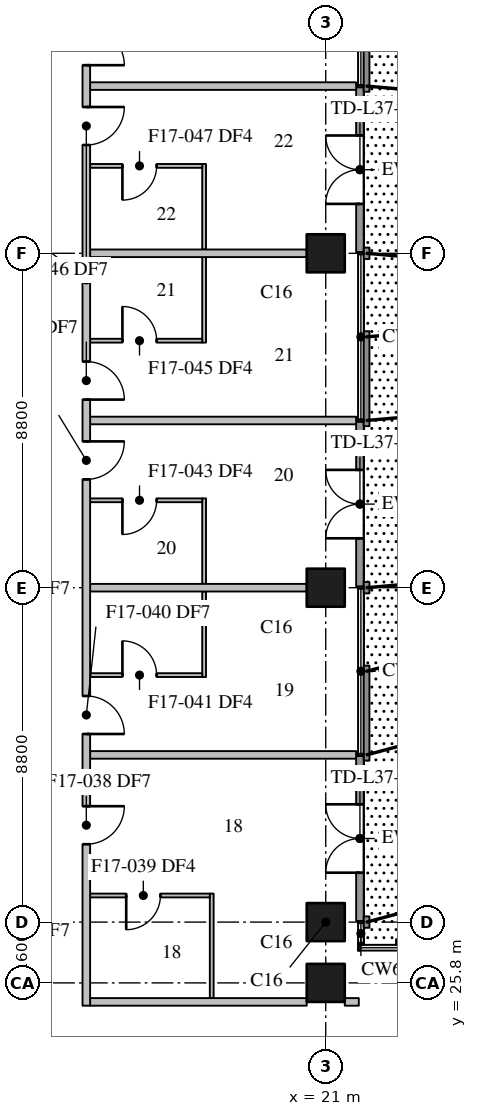
"""IFC4 building model, lengths in metres.
Left out: names, types, materials, properties, quantities, classifications, styles, units other than length and angle.
Written with IfcOpenShell. Run it as: python <this file> out.ifc"""

import sys

from ifc_helpers import new_model, si_unit, direction, frame, frame_2d, origin, origin_2d, place, context, subcontext, project, spatial, rectangle, extrude, element, fill, save


model = new_model("IFC4")
c1 = context("Model", 3, precision=1e-05, world=origin(), true_north=direction((0.0, 1.0)))
c2 = subcontext(c1, "Body", "Model", "MODEL_VIEW")
j1 = project(units=[si_unit("LENGTHUNIT", "METRE"), si_unit("PLANEANGLEUNIT", "RADIAN")], contexts=[c1])
p1 = place(None, origin())
s1 = spatial("IfcSite", under=j1, at=p1, CompositionType="ELEMENT")
p2 = place(p1, origin())
s2 = spatial("IfcBuilding", under=s1, at=p2, CompositionType="ELEMENT")
p3 = place(p2, frame((0.0, 0.0, 153.1)))
s3 = spatial("IfcBuildingStorey", under=s2, at=p3, CompositionType="ELEMENT", Elevation=153.1)
for number, where, z_axis, x_axis in (
    (1, (21.0, 25.8, 0.0), (0.0, 0.0, 1.0), (1.0, 0.0, 0.0)),
    (2, (21.0, 27.4, 0.0), (0.0, 0.0, 1.0), (1.0, 0.0, 0.0)),
    (3, (21.0, 36.2, 0.0), (0.0, 0.0, 1.0), (1.0, 0.0, 0.0)),
    (4, (21.0, 45.0, 0.0), (0.0, 0.0, 1.0), (1.0, 0.0, 0.0)),
):
    element("IfcColumn", number, at=place(p3, frame(where, z_axis=z_axis, x_axis=x_axis)), inside=s3, PredefinedType="COLUMN", context=c2, shape_type="SweptSolid", body=[
        extrude(rectangle(XDim=1.0, YDim=1.0, at=origin_2d()), origin(), (0.0, 0.0, 1.0), 3.7),
    ])
p4 = place(p3, frame((21.9, 27.43, 0.0), z_axis=(0.0, 0.0, 1.0), x_axis=(0.0, 1.0, 0.0)))
e5 = element("IfcWall", 5, at=p4, inside=s3, PredefinedType="STANDARD", context=c2, shape_type="SweptSolid", body=[
    extrude(rectangle(XDim=4.34, YDim=0.2, at=frame_2d((2.17, 0.0))), origin(), (0.0, 0.0, 1.0), 3.4),
])
p5 = place(p4, frame((1.27, 0.0, 0.0)))
e6 = element("IfcOpeningElement", 6, at=p5, cuts=e5, PredefinedType="OPENING", context=c2, shape_type="SweptSolid", body=[
    extrude(rectangle(XDim=1.8, YDim=2.4, at=frame_2d((0.9, 1.2))), frame((0.0, 0.11, 0.0), z_axis=(0.0, -1.0, 0.0), x_axis=(1.0, 0.0, 0.0)), (0.0, 0.0, 1.0), 0.22),
])
p6 = place(p3, frame((21.9, 36.23, 0.0), z_axis=(0.0, 0.0, 1.0), x_axis=(0.0, 1.0, 0.0)))
e7 = element("IfcWall", 7, at=p6, inside=s3, PredefinedType="STANDARD", context=c2, shape_type="SweptSolid", body=[
    extrude(rectangle(XDim=4.34, YDim=0.2, at=frame_2d((2.17, 0.0))), origin(), (0.0, 0.0, 1.0), 3.4),
])
p7 = place(p6, frame((1.27, 0.0, 0.0)))
e8 = element("IfcOpeningElement", 8, at=p7, cuts=e7, PredefinedType="OPENING", context=c2, shape_type="SweptSolid", body=[
    extrude(rectangle(XDim=1.8, YDim=2.4, at=frame_2d((0.9, 1.2))), frame((0.0, 0.11, 0.0), z_axis=(0.0, -1.0, 0.0), x_axis=(1.0, 0.0, 0.0)), (0.0, 0.0, 1.0), 0.22),
])
p8 = place(p3, frame((21.9, 45.03, 0.0), z_axis=(0.0, 0.0, 1.0), x_axis=(0.0, 1.0, 0.0)))
e9 = element("IfcWall", 9, at=p8, inside=s3, PredefinedType="STANDARD", context=c2, shape_type="SweptSolid", body=[
    extrude(rectangle(XDim=4.34, YDim=0.2, at=frame_2d((2.17, 0.0))), origin(), (0.0, 0.0, 1.0), 3.4),
])
p9 = place(p8, frame((1.27, 0.0, 0.0)))
e10 = element("IfcOpeningElement", 10, at=p9, cuts=e9, PredefinedType="OPENING", context=c2, shape_type="SweptSolid", body=[
    extrude(rectangle(XDim=1.8, YDim=2.4, at=frame_2d((0.9, 1.2))), frame((0.0, 0.11, 0.0), z_axis=(0.0, -1.0, 0.0), x_axis=(1.0, 0.0, 0.0)), (0.0, 0.0, 1.0), 0.22),
])
p10 = place(p3, frame((14.8, 31.8, 0.0), z_axis=(0.0, 0.0, 1.0), x_axis=(1.0, 0.0, 0.0)))
e11 = element("IfcWall", 11, at=p10, inside=s3, PredefinedType="PARTITIONING", context=c2, shape_type="SweptSolid", body=[
    extrude(rectangle(XDim=7.0, YDim=0.2, at=frame_2d((3.5, 0.0))), origin(), (0.0, 0.0, 1.0), 3.4),
])
p11 = place(p3, frame((14.8, 36.2, 0.0), z_axis=(0.0, 0.0, 1.0), x_axis=(1.0, 0.0, 0.0)))
e12 = element("IfcWall", 12, at=p11, inside=s3, PredefinedType="PARTITIONING", context=c2, shape_type="SweptSolid", body=[
    extrude(rectangle(XDim=5.7, YDim=0.2, at=frame_2d((2.85, 0.0))), origin(), (0.0, 0.0, 1.0), 3.4),
])
for number, where, z_axis, x_axis in (
    (13, (14.8, 40.6, 0.0), (0.0, 0.0, 1.0), (1.0, 0.0, 0.0)),
    (14, (14.8, 49.4, 0.0), (0.0, 0.0, 1.0), (1.0, 0.0, 0.0)),
):
    element("IfcWall", number, at=place(p3, frame(where, z_axis=z_axis, x_axis=x_axis)), inside=s3, PredefinedType="PARTITIONING", context=c2, shape_type="SweptSolid", body=[
        extrude(rectangle(XDim=7.0, YDim=0.2, at=frame_2d((3.5, 0.0))), origin(), (0.0, 0.0, 1.0), 3.4),
    ])
p12 = place(p3, frame((14.7, 63.4, 0.0), z_axis=(0.0, 0.0, 1.0), x_axis=(0.0, -1.0, 0.0)))
e15 = element("IfcWall", 15, at=p12, inside=s3, PredefinedType="PARTITIONING", context=c2, shape_type="SweptSolid", body=[
    extrude(rectangle(XDim=38.2, YDim=0.2, at=frame_2d((19.1, 0.0))), origin(), (0.0, 0.0, 1.0), 3.4),
])
p13 = place(p12, frame((32.95, 0.0, 0.0)))
e16 = element("IfcOpeningElement", 16, at=p13, cuts=e15, PredefinedType="OPENING", context=c2, shape_type="SweptSolid", body=[
    extrude(rectangle(XDim=1.0, YDim=2.1, at=frame_2d((0.5, 1.05))), frame((0.0, 0.11, 0.0), z_axis=(0.0, -1.0, 0.0), x_axis=(1.0, 0.0, 0.0)), (0.0, 0.0, 1.0), 0.22),
])
p14 = place(p12, frame((30.05, 0.0, 0.0)))
e17 = element("IfcOpeningElement", 17, at=p14, cuts=e15, PredefinedType="OPENING", context=c2, shape_type="SweptSolid", body=[
    extrude(rectangle(XDim=1.0, YDim=2.1, at=frame_2d((0.5, 1.05))), frame((0.0, 0.11, 0.0), z_axis=(0.0, -1.0, 0.0), x_axis=(1.0, 0.0, 0.0)), (0.0, 0.0, 1.0), 0.22),
])
p15 = place(p12, frame((23.35, 0.0, 0.0)))
e18 = element("IfcOpeningElement", 18, at=p15, cuts=e15, PredefinedType="OPENING", context=c2, shape_type="SweptSolid", body=[
    extrude(rectangle(XDim=1.0, YDim=2.1, at=frame_2d((0.5, 1.05))), frame((0.0, 0.11, 0.0), z_axis=(0.0, -1.0, 0.0), x_axis=(1.0, 0.0, 0.0)), (0.0, 0.0, 1.0), 0.22),
])
p16 = place(p12, frame((21.25, 0.0, 0.0)))
e19 = element("IfcOpeningElement", 19, at=p16, cuts=e15, PredefinedType="OPENING", context=c2, shape_type="SweptSolid", body=[
    extrude(rectangle(XDim=1.0, YDim=2.1, at=frame_2d((0.5, 1.05))), frame((0.0, 0.11, 0.0), z_axis=(0.0, -1.0, 0.0), x_axis=(1.0, 0.0, 0.0)), (0.0, 0.0, 1.0), 0.22),
])
p17 = place(p12, frame((14.55, 0.0, 0.0)))
e20 = element("IfcOpeningElement", 20, at=p17, cuts=e15, PredefinedType="OPENING", context=c2, shape_type="SweptSolid", body=[
    extrude(rectangle(XDim=1.0, YDim=2.1, at=frame_2d((0.5, 1.05))), frame((0.0, 0.11, 0.0), z_axis=(0.0, -1.0, 0.0), x_axis=(1.0, 0.0, 0.0)), (0.0, 0.0, 1.0), 0.22),
])
p18 = place(p12, frame((12.45, 0.0, 0.0)))
e21 = element("IfcOpeningElement", 21, at=p18, cuts=e15, PredefinedType="OPENING", context=c2, shape_type="SweptSolid", body=[
    extrude(rectangle(XDim=1.0, YDim=2.1, at=frame_2d((0.5, 1.05))), frame((0.0, 0.11, 0.0), z_axis=(0.0, -1.0, 0.0), x_axis=(1.0, 0.0, 0.0)), (0.0, 0.0, 1.0), 0.22),
])
p19 = place(p12, frame((1.95, 0.0, 0.0)))
e22 = element("IfcOpeningElement", 22, at=p19, cuts=e15, PredefinedType="OPENING", context=c2, shape_type="SweptSolid", body=[
    extrude(rectangle(XDim=1.1, YDim=2.1, at=frame_2d((0.55, 1.05))), frame((0.0, 0.11, 0.0), z_axis=(0.0, -1.0, 0.0), x_axis=(1.0, 0.0, 0.0)), (0.0, 0.0, 1.0), 0.22),
])
p20 = place(p3, frame((14.8, 25.3, 0.0), z_axis=(0.0, 0.0, 1.0), x_axis=(1.0, 0.0, 0.0)))
e23 = element("IfcWall", 23, at=p20, inside=s3, PredefinedType="PARTITIONING", context=c2, shape_type="SweptSolid", body=[
    extrude(rectangle(XDim=5.7, YDim=0.2, at=frame_2d((2.85, 0.0))), origin(), (0.0, 0.0, 1.0), 3.4),
])
p21 = place(p3, frame((21.5, 25.3, 0.0), z_axis=(0.0, 0.0, 1.0), x_axis=(1.0, 0.0, 0.0)))
e24 = element("IfcWall", 24, at=p21, inside=s3, PredefinedType="PARTITIONING", context=c2, shape_type="SweptSolid", body=[
    extrude(rectangle(XDim=0.37, YDim=0.2, at=frame_2d((0.185, 0.0))), origin(), (0.0, 0.0, 1.0), 3.4),
])
p22 = place(p3, frame((14.8, 45.0, 0.0), z_axis=(0.0, 0.0, 1.0), x_axis=(1.0, 0.0, 0.0)))
e25 = element("IfcWall", 25, at=p22, inside=s3, PredefinedType="PARTITIONING", context=c2, shape_type="SweptSolid", body=[
    extrude(rectangle(XDim=5.7, YDim=0.2, at=frame_2d((2.85, 0.0))), origin(), (0.0, 0.0, 1.0), 3.4),
])
p23 = place(p3, frame((18.0, 25.4, 0.0), z_axis=(0.0, 0.0, 1.0), x_axis=(0.0, 1.0, 0.0)))
e26 = element("IfcWall", 26, at=p23, inside=s3, PredefinedType="PARTITIONING", context=c2, shape_type="SweptSolid", body=[
    extrude(rectangle(XDim=2.75, YDim=0.1, at=frame_2d((1.375, 0.0))), origin(), (0.0, 0.0, 1.0), 3.4),
])
p24 = place(p3, frame((17.95, 28.1, 0.0), z_axis=(0.0, 0.0, 1.0), x_axis=(-1.0, 0.0, 0.0)))
e27 = element("IfcWall", 27, at=p24, inside=s3, PredefinedType="PARTITIONING", context=c2, shape_type="SweptSolid", body=[
    extrude(rectangle(XDim=3.15, YDim=0.1, at=frame_2d((1.575, 0.0))), origin(), (0.0, 0.0, 1.0), 3.4),
])
p25 = place(p24, frame((1.3, 0.0, 0.0)))
e28 = element("IfcOpeningElement", 28, at=p25, cuts=e27, PredefinedType="OPENING", context=c2, shape_type="SweptSolid", body=[
    extrude(rectangle(XDim=0.9, YDim=2.1, at=frame_2d((0.45, 1.05))), frame((0.0, 0.06, 0.0), z_axis=(0.0, -1.0, 0.0), x_axis=(1.0, 0.0, 0.0)), (0.0, 0.0, 1.0), 0.12),
])
for number, where, z_axis, x_axis in (
    (29, (17.8, 33.85, 0.0), (0.0, 0.0, 1.0), (0.0, 1.0, 0.0)),
    (30, (17.8, 36.3, 0.0), (0.0, 0.0, 1.0), (0.0, 1.0, 0.0)),
    (31, (17.8, 42.65, 0.0), (0.0, 0.0, 1.0), (0.0, 1.0, 0.0)),
    (32, (17.8, 45.1, 0.0), (0.0, 0.0, 1.0), (0.0, 1.0, 0.0)),
):
    element("IfcWall", number, at=place(p3, frame(where, z_axis=z_axis, x_axis=x_axis)), inside=s3, PredefinedType="PARTITIONING", context=c2, shape_type="SweptSolid", body=[
        extrude(rectangle(XDim=2.25, YDim=0.1, at=frame_2d((1.125, 0.0))), origin(), (0.0, 0.0, 1.0), 3.4),
    ])
p26 = place(p3, frame((14.8, 33.9, 0.0), z_axis=(0.0, 0.0, 1.0), x_axis=(1.0, 0.0, 0.0)))
e33 = element("IfcWall", 33, at=p26, inside=s3, PredefinedType="PARTITIONING", context=c2, shape_type="SweptSolid", body=[
    extrude(rectangle(XDim=2.95, YDim=0.1, at=frame_2d((1.475, 0.0))), origin(), (0.0, 0.0, 1.0), 3.4),
])
p27 = place(p26, frame((0.85, 0.0, 0.0)))
e34 = element("IfcOpeningElement", 34, at=p27, cuts=e33, PredefinedType="OPENING", context=c2, shape_type="SweptSolid", body=[
    extrude(rectangle(XDim=0.9, YDim=2.1, at=frame_2d((0.45, 1.05))), frame((0.0, 0.06, 0.0), z_axis=(0.0, -1.0, 0.0), x_axis=(1.0, 0.0, 0.0)), (0.0, 0.0, 1.0), 0.12),
])
p28 = place(p3, frame((17.75, 38.5, 0.0), z_axis=(0.0, 0.0, 1.0), x_axis=(-1.0, 0.0, 0.0)))
e35 = element("IfcWall", 35, at=p28, inside=s3, PredefinedType="PARTITIONING", context=c2, shape_type="SweptSolid", body=[
    extrude(rectangle(XDim=2.95, YDim=0.1, at=frame_2d((1.475, 0.0))), origin(), (0.0, 0.0, 1.0), 3.4),
])
p29 = place(p28, frame((1.2, 0.0, 0.0)))
e36 = element("IfcOpeningElement", 36, at=p29, cuts=e35, PredefinedType="OPENING", context=c2, shape_type="SweptSolid", body=[
    extrude(rectangle(XDim=0.9, YDim=2.1, at=frame_2d((0.45, 1.05))), frame((0.0, 0.06, 0.0), z_axis=(0.0, -1.0, 0.0), x_axis=(1.0, 0.0, 0.0)), (0.0, 0.0, 1.0), 0.12),
])
p30 = place(p3, frame((14.8, 42.7, 0.0), z_axis=(0.0, 0.0, 1.0), x_axis=(1.0, 0.0, 0.0)))
e37 = element("IfcWall", 37, at=p30, inside=s3, PredefinedType="PARTITIONING", context=c2, shape_type="SweptSolid", body=[
    extrude(rectangle(XDim=2.95, YDim=0.1, at=frame_2d((1.475, 0.0))), origin(), (0.0, 0.0, 1.0), 3.4),
])
p31 = place(p30, frame((0.85, 0.0, 0.0)))
e38 = element("IfcOpeningElement", 38, at=p31, cuts=e37, PredefinedType="OPENING", context=c2, shape_type="SweptSolid", body=[
    extrude(rectangle(XDim=0.9, YDim=2.1, at=frame_2d((0.45, 1.05))), frame((0.0, 0.06, 0.0), z_axis=(0.0, -1.0, 0.0), x_axis=(1.0, 0.0, 0.0)), (0.0, 0.0, 1.0), 0.12),
])
p32 = place(p3, frame((17.75, 47.3, 0.0), z_axis=(0.0, 0.0, 1.0), x_axis=(-1.0, 0.0, 0.0)))
e39 = element("IfcWall", 39, at=p32, inside=s3, PredefinedType="PARTITIONING", context=c2, shape_type="SweptSolid", body=[
    extrude(rectangle(XDim=2.95, YDim=0.1, at=frame_2d((1.475, 0.0))), origin(), (0.0, 0.0, 1.0), 3.4),
])
p33 = place(p32, frame((1.2, 0.0, 0.0)))
e40 = element("IfcOpeningElement", 40, at=p33, cuts=e39, PredefinedType="OPENING", context=c2, shape_type="SweptSolid", body=[
    extrude(rectangle(XDim=0.9, YDim=2.1, at=frame_2d((0.45, 1.05))), frame((0.0, 0.06, 0.0), z_axis=(0.0, -1.0, 0.0), x_axis=(1.0, 0.0, 0.0)), (0.0, 0.0, 1.0), 0.12),
])
p34 = place(p5, origin())
e41 = element("IfcDoor", 41, at=p34, inside=s3, OperationType="SINGLE_SWING_LEFT", PredefinedType="DOOR", context=c2, shape_type="SweptSolid", body=[
    extrude(rectangle(XDim=1.8, YDim=2.4, at=frame_2d((0.9, 1.2))), frame((0.0, 0.025, 0.0), z_axis=(0.0, -1.0, 0.0), x_axis=(1.0, 0.0, 0.0)), (0.0, 0.0, 1.0), 0.05),
])
fill(e6, e41)
p35 = place(p7, origin())
e42 = element("IfcDoor", 42, at=p35, inside=s3, OperationType="SINGLE_SWING_LEFT", PredefinedType="DOOR", context=c2, shape_type="SweptSolid", body=[
    extrude(rectangle(XDim=1.8, YDim=2.4, at=frame_2d((0.9, 1.2))), frame((0.0, 0.025, 0.0), z_axis=(0.0, -1.0, 0.0), x_axis=(1.0, 0.0, 0.0)), (0.0, 0.0, 1.0), 0.05),
])
fill(e8, e42)
p36 = place(p9, origin())
e43 = element("IfcDoor", 43, at=p36, inside=s3, OperationType="SINGLE_SWING_LEFT", PredefinedType="DOOR", context=c2, shape_type="SweptSolid", body=[
    extrude(rectangle(XDim=1.8, YDim=2.4, at=frame_2d((0.9, 1.2))), frame((0.0, 0.025, 0.0), z_axis=(0.0, -1.0, 0.0), x_axis=(1.0, 0.0, 0.0)), (0.0, 0.0, 1.0), 0.05),
])
fill(e10, e43)
p37 = place(p13, origin())
e44 = element("IfcDoor", 44, at=p37, inside=s3, OperationType="SINGLE_SWING_LEFT", PredefinedType="DOOR", context=c2, shape_type="SweptSolid", body=[
    extrude(rectangle(XDim=1.0, YDim=2.1, at=frame_2d((0.5, 1.05))), frame((0.0, 0.025, 0.0), z_axis=(0.0, -1.0, 0.0), x_axis=(1.0, 0.0, 0.0)), (0.0, 0.0, 1.0), 0.05),
])
fill(e16, e44)
p38 = place(p25, origin())
e45 = element("IfcDoor", 45, at=p38, inside=s3, OperationType="SINGLE_SWING_RIGHT", PredefinedType="DOOR", context=c2, shape_type="SweptSolid", body=[
    extrude(rectangle(XDim=0.9, YDim=2.1, at=frame_2d((0.45, 1.05))), frame((0.0, 0.025, 0.0), z_axis=(0.0, -1.0, 0.0), x_axis=(1.0, 0.0, 0.0)), (0.0, 0.0, 1.0), 0.05),
])
fill(e28, e45)
p39 = place(p14, origin())
e46 = element("IfcDoor", 46, at=p39, inside=s3, OperationType="SINGLE_SWING_RIGHT", PredefinedType="DOOR", context=c2, shape_type="SweptSolid", body=[
    extrude(rectangle(XDim=1.0, YDim=2.1, at=frame_2d((0.5, 1.05))), frame((0.0, 0.025, 0.0), z_axis=(0.0, -1.0, 0.0), x_axis=(1.0, 0.0, 0.0)), (0.0, 0.0, 1.0), 0.05),
])
fill(e17, e46)
p40 = place(p27, origin())
e47 = element("IfcDoor", 47, at=p40, inside=s3, OperationType="SINGLE_SWING_LEFT", PredefinedType="DOOR", context=c2, shape_type="SweptSolid", body=[
    extrude(rectangle(XDim=0.9, YDim=2.1, at=frame_2d((0.45, 1.05))), frame((0.0, 0.025, 0.0), z_axis=(0.0, -1.0, 0.0), x_axis=(1.0, 0.0, 0.0)), (0.0, 0.0, 1.0), 0.05),
])
fill(e34, e47)
p41 = place(p15, origin())
e48 = element("IfcDoor", 48, at=p41, inside=s3, OperationType="SINGLE_SWING_LEFT", PredefinedType="DOOR", context=c2, shape_type="SweptSolid", body=[
    extrude(rectangle(XDim=1.0, YDim=2.1, at=frame_2d((0.5, 1.05))), frame((0.0, 0.025, 0.0), z_axis=(0.0, -1.0, 0.0), x_axis=(1.0, 0.0, 0.0)), (0.0, 0.0, 1.0), 0.05),
])
fill(e18, e48)
p42 = place(p29, origin())
e49 = element("IfcDoor", 49, at=p42, inside=s3, OperationType="SINGLE_SWING_RIGHT", PredefinedType="DOOR", context=c2, shape_type="SweptSolid", body=[
    extrude(rectangle(XDim=0.9, YDim=2.1, at=frame_2d((0.45, 1.05))), frame((0.0, 0.025, 0.0), z_axis=(0.0, -1.0, 0.0), x_axis=(1.0, 0.0, 0.0)), (0.0, 0.0, 1.0), 0.05),
])
fill(e36, e49)
p43 = place(p16, origin())
e50 = element("IfcDoor", 50, at=p43, inside=s3, OperationType="SINGLE_SWING_RIGHT", PredefinedType="DOOR", context=c2, shape_type="SweptSolid", body=[
    extrude(rectangle(XDim=1.0, YDim=2.1, at=frame_2d((0.5, 1.05))), frame((0.0, 0.025, 0.0), z_axis=(0.0, -1.0, 0.0), x_axis=(1.0, 0.0, 0.0)), (0.0, 0.0, 1.0), 0.05),
])
fill(e19, e50)
p44 = place(p31, origin())
e51 = element("IfcDoor", 51, at=p44, inside=s3, OperationType="SINGLE_SWING_LEFT", PredefinedType="DOOR", context=c2, shape_type="SweptSolid", body=[
    extrude(rectangle(XDim=0.9, YDim=2.1, at=frame_2d((0.45, 1.05))), frame((0.0, 0.025, 0.0), z_axis=(0.0, -1.0, 0.0), x_axis=(1.0, 0.0, 0.0)), (0.0, 0.0, 1.0), 0.05),
])
fill(e38, e51)
p45 = place(p17, origin())
e52 = element("IfcDoor", 52, at=p45, inside=s3, OperationType="SINGLE_SWING_LEFT", PredefinedType="DOOR", context=c2, shape_type="SweptSolid", body=[
    extrude(rectangle(XDim=1.0, YDim=2.1, at=frame_2d((0.5, 1.05))), frame((0.0, 0.025, 0.0), z_axis=(0.0, -1.0, 0.0), x_axis=(1.0, 0.0, 0.0)), (0.0, 0.0, 1.0), 0.05),
])
fill(e20, e52)
p46 = place(p33, origin())
e53 = element("IfcDoor", 53, at=p46, inside=s3, OperationType="SINGLE_SWING_RIGHT", PredefinedType="DOOR", context=c2, shape_type="SweptSolid", body=[
    extrude(rectangle(XDim=0.9, YDim=2.1, at=frame_2d((0.45, 1.05))), frame((0.0, 0.025, 0.0), z_axis=(0.0, -1.0, 0.0), x_axis=(1.0, 0.0, 0.0)), (0.0, 0.0, 1.0), 0.05),
])
fill(e40, e53)
p47 = place(p18, origin())
e54 = element("IfcDoor", 54, at=p47, inside=s3, OperationType="SINGLE_SWING_RIGHT", PredefinedType="DOOR", context=c2, shape_type="SweptSolid", body=[
    extrude(rectangle(XDim=1.0, YDim=2.1, at=frame_2d((0.5, 1.05))), frame((0.0, 0.025, 0.0), z_axis=(0.0, -1.0, 0.0), x_axis=(1.0, 0.0, 0.0)), (0.0, 0.0, 1.0), 0.05),
])
fill(e21, e54)
save(model, sys.argv[1])
